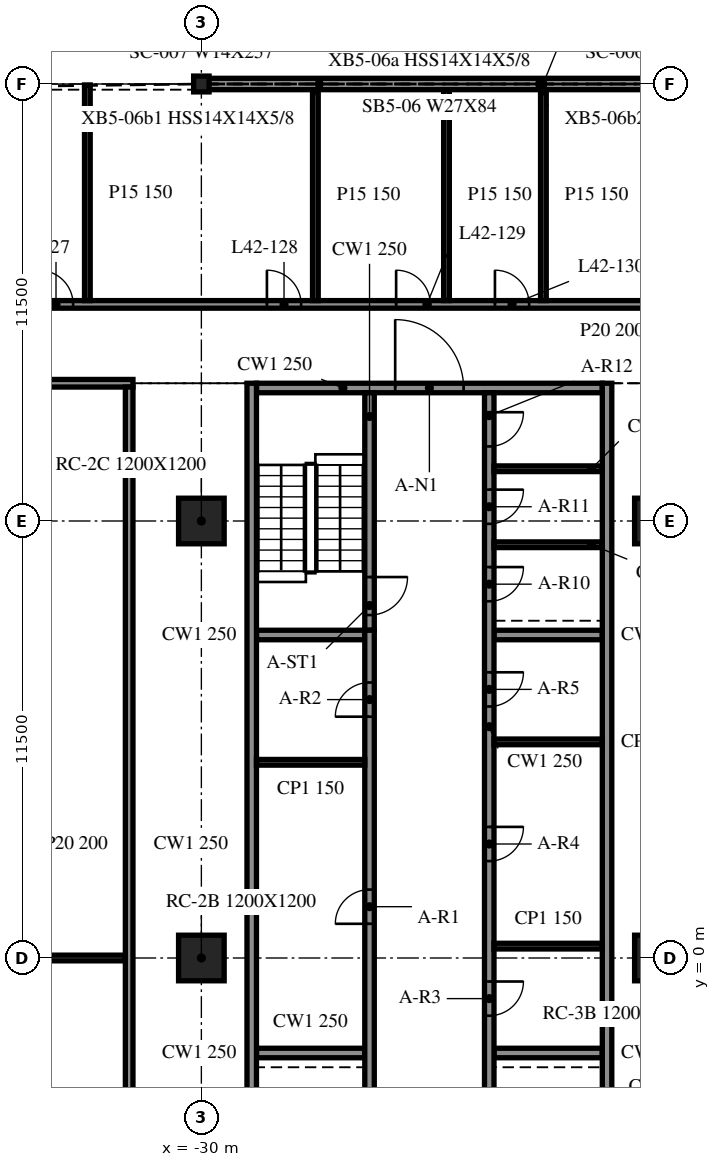
"""IFC4 building model, lengths in metres.
Left out: names, types, materials, properties, quantities, classifications, styles, units other than length and angle.
Written with IfcOpenShell. Run it as: python <this file> out.ifc"""

import sys

from ifc_helpers import new_model, si_unit, direction, frame, frame_2d, origin, origin_2d, place, context, subcontext, project, spatial, rectangle, i_section, extrude, element, fill, save


model = new_model("IFC4")
c1 = context("Model", 3, precision=1e-05, world=origin(), true_north=direction((0.0, 1.0)))
c2 = subcontext(c1, "Body", "Model", "MODEL_VIEW")
j1 = project(units=[si_unit("LENGTHUNIT", "METRE"), si_unit("PLANEANGLEUNIT", "RADIAN")], contexts=[c1])
p1 = place(None, origin())
s1 = spatial("IfcSite", under=j1, at=p1, CompositionType="ELEMENT")
p2 = place(p1, origin())
s2 = spatial("IfcBuilding", under=s1, at=p2, CompositionType="ELEMENT")
p3 = place(p2, frame((0.0, 0.0, 178.2)))
s3 = spatial("IfcBuildingStorey", under=s2, at=p3, CompositionType="ELEMENT", Elevation=178.2)
for number, where, z_axis, x_axis in (
    (1, (-30.0, 0.0, -0.34), (0.0, 0.0, 1.0), (1.0, 0.0, 0.0)),
    (2, (-30.0, 11.5, -0.34), (0.0, 0.0, 1.0), (1.0, 0.0, 0.0)),
    (3, (-18.0, 0.0, -0.34), (0.0, 0.0, 1.0), (1.0, 0.0, 0.0)),
    (4, (-18.0, 11.5, -0.34), (0.0, 0.0, 1.0), (1.0, 0.0, 0.0)),
):
    element("IfcColumn", number, at=place(p3, frame(where, z_axis=z_axis, x_axis=x_axis)), inside=s3, PredefinedType="COLUMN", context=c2, shape_type="SweptSolid", body=[
        extrude(rectangle(XDim=1.2, YDim=1.2, at=origin_2d()), origin(), (0.0, 0.0, 1.0), 3.8),
    ])
p4 = place(p3, frame((-30.0, 23.0, -0.34), z_axis=(0.0, 0.0, 1.0), x_axis=(1.0, 0.0, 0.0)))
e5 = element("IfcColumn", 5, at=p4, inside=s3, PredefinedType="COLUMN", context=c2, shape_type="SweptSolid", body=[
    extrude(i_section(OverallWidth=0.406, OverallDepth=0.417, WebThickness=0.03, FlangeThickness=0.048, at=origin_2d()), origin(), (0.0, 0.0, 1.0), 3.8),
])
p5 = place(p3, frame((-18.015, 23.0, 0.0), z_axis=(0.0, 0.0, 1.0), x_axis=(-1.0, 0.0, 0.0)))
e6 = element("IfcWall", 6, at=p5, inside=s3, PredefinedType="NOTDEFINED", context=c2, shape_type="SweptSolid", body=[
    extrude(rectangle(XDim=11.97, YDim=0.3, at=frame_2d((5.985, 0.0))), origin(), (0.0, 0.0, 1.0), 2.782),
])
for number, where, z_axis, x_axis in (
    (7, (-28.675, 15.125, 0.0), (0.0, 0.0, 1.0), (0.0, -1.0, 0.0)),
    (8, (-19.325, -9.125, 0.0), (0.0, 0.0, 1.0), (0.0, 1.0, 0.0)),
):
    element("IfcWall", number, at=place(p3, frame(where, z_axis=z_axis, x_axis=x_axis)), inside=s3, PredefinedType="SOLIDWALL", context=c2, shape_type="SweptSolid", body=[
        extrude(rectangle(XDim=24.25, YDim=0.25, at=frame_2d((12.125, 0.0))), origin(), (0.0, 0.0, 1.0), 3.46),
    ])
p6 = place(p3, frame((-28.55, 15.0, 0.0), z_axis=(0.0, 0.0, 1.0), x_axis=(1.0, 0.0, 0.0)))
e9 = element("IfcWall", 9, at=p6, inside=s3, PredefinedType="SOLIDWALL", context=c2, shape_type="SweptSolid", body=[
    extrude(rectangle(XDim=9.1, YDim=0.25, at=frame_2d((4.55, 0.0))), origin(), (0.0, 0.0, 1.0), 3.46),
])
p7 = place(p6, frame((3.65, 0.0, 0.0)))
e10 = element("IfcOpeningElement", 10, at=p7, cuts=e9, PredefinedType="OPENING", context=c2, shape_type="SweptSolid", body=[
    extrude(rectangle(XDim=1.8, YDim=2.1, at=frame_2d((0.9, 1.05))), frame((0.0, 0.135, 0.0), z_axis=(0.0, -1.0, 0.0), x_axis=(1.0, 0.0, 0.0)), (0.0, 0.0, 1.0), 0.27),
])
p8 = place(p3, frame((-25.575, -8.875, 0.0), z_axis=(0.0, 0.0, 1.0), x_axis=(0.0, 1.0, 0.0)))
e11 = element("IfcWall", 11, at=p8, inside=s3, PredefinedType="SOLIDWALL", context=c2, shape_type="SweptSolid", body=[
    extrude(rectangle(XDim=17.5, YDim=0.25, at=frame_2d((8.75, 0.0))), origin(), (0.0, 0.0, 1.0), 3.46),
])
p9 = place(p8, frame((9.775, 0.0, 0.0)))
e12 = element("IfcOpeningElement", 12, at=p9, cuts=e11, PredefinedType="OPENING", context=c2, shape_type="SweptSolid", body=[
    extrude(rectangle(XDim=0.9, YDim=2.1, at=frame_2d((0.45, 1.05))), frame((0.0, 0.135, 0.0), z_axis=(0.0, -1.0, 0.0), x_axis=(1.0, 0.0, 0.0)), (0.0, 0.0, 1.0), 0.27),
])
p10 = place(p8, frame((15.225, 0.0, 0.0)))
e13 = element("IfcOpeningElement", 13, at=p10, cuts=e11, PredefinedType="OPENING", context=c2, shape_type="SweptSolid", body=[
    extrude(rectangle(XDim=0.9, YDim=2.1, at=frame_2d((0.45, 1.05))), frame((0.0, 0.135, 0.0), z_axis=(0.0, -1.0, 0.0), x_axis=(1.0, 0.0, 0.0)), (0.0, 0.0, 1.0), 0.27),
])
p11 = place(p8, frame((0.712, 0.0, 0.0)))
e14 = element("IfcOpeningElement", 14, at=p11, cuts=e11, PredefinedType="OPENING", context=c2, shape_type="SweptSolid", body=[
    extrude(rectangle(XDim=0.9, YDim=2.1, at=frame_2d((0.45, 1.05))), frame((0.0, 0.135, 0.0), z_axis=(0.0, -1.0, 0.0), x_axis=(1.0, 0.0, 0.0)), (0.0, 0.0, 1.0), 0.27),
])
p12 = place(p8, frame((3.788, 0.0, 0.0)))
e15 = element("IfcOpeningElement", 15, at=p12, cuts=e11, PredefinedType="OPENING", context=c2, shape_type="SweptSolid", body=[
    extrude(rectangle(XDim=0.9, YDim=2.1, at=frame_2d((0.45, 1.05))), frame((0.0, 0.135, 0.0), z_axis=(0.0, -1.0, 0.0), x_axis=(1.0, 0.0, 0.0)), (0.0, 0.0, 1.0), 0.27),
])
p13 = place(p3, frame((-25.575, 14.875, 0.0), z_axis=(0.0, 0.0, 1.0), x_axis=(0.0, -1.0, 0.0)))
e16 = element("IfcWall", 16, at=p13, inside=s3, PredefinedType="SOLIDWALL", context=c2, shape_type="SweptSolid", body=[
    extrude(rectangle(XDim=6.25, YDim=0.25, at=frame_2d((3.125, 0.0))), origin(), (0.0, 0.0, 1.0), 3.46),
])
p14 = place(p13, frame((4.85, 0.0, 0.0)))
e17 = element("IfcOpeningElement", 17, at=p14, cuts=e16, PredefinedType="OPENING", context=c2, shape_type="SweptSolid", body=[
    extrude(rectangle(XDim=1.0, YDim=2.1, at=frame_2d((0.5, 1.05))), frame((0.0, 0.135, 0.0), z_axis=(0.0, -1.0, 0.0), x_axis=(1.0, 0.0, 0.0)), (0.0, 0.0, 1.0), 0.27),
])
p15 = place(p3, frame((-22.425, 14.875, 0.0), z_axis=(0.0, 0.0, 1.0), x_axis=(0.0, -1.0, 0.0)))
e18 = element("IfcWall", 18, at=p15, inside=s3, PredefinedType="SOLIDWALL", context=c2, shape_type="SweptSolid", body=[
    extrude(rectangle(XDim=23.75, YDim=0.25, at=frame_2d((11.875, 0.0))), origin(), (0.0, 0.0, 1.0), 3.46),
])
p16 = place(p15, frame((15.494, 0.0, 0.0)))
e19 = element("IfcOpeningElement", 19, at=p16, cuts=e18, PredefinedType="OPENING", context=c2, shape_type="SweptSolid", body=[
    extrude(rectangle(XDim=0.9, YDim=2.1, at=frame_2d((0.45, 1.05))), frame((0.0, 0.135, 0.0), z_axis=(0.0, -1.0, 0.0), x_axis=(1.0, 0.0, 0.0)), (0.0, 0.0, 1.0), 0.27),
])
p17 = place(p15, frame((11.425, 0.0, 0.0)))
e20 = element("IfcOpeningElement", 20, at=p17, cuts=e18, PredefinedType="OPENING", context=c2, shape_type="SweptSolid", body=[
    extrude(rectangle(XDim=0.9, YDim=2.1, at=frame_2d((0.45, 1.05))), frame((0.0, 0.135, 0.0), z_axis=(0.0, -1.0, 0.0), x_axis=(1.0, 0.0, 0.0)), (0.0, 0.0, 1.0), 0.27),
])
p18 = place(p15, frame((7.356, 0.0, 0.0)))
e21 = element("IfcOpeningElement", 21, at=p18, cuts=e18, PredefinedType="OPENING", context=c2, shape_type="SweptSolid", body=[
    extrude(rectangle(XDim=0.9, YDim=2.1, at=frame_2d((0.45, 1.05))), frame((0.0, 0.135, 0.0), z_axis=(0.0, -1.0, 0.0), x_axis=(1.0, 0.0, 0.0)), (0.0, 0.0, 1.0), 0.27),
])
p19 = place(p15, frame((21.837, 0.0, 0.0)))
e22 = element("IfcOpeningElement", 22, at=p19, cuts=e18, PredefinedType="OPENING", context=c2, shape_type="SweptSolid", body=[
    extrude(rectangle(XDim=0.9, YDim=2.1, at=frame_2d((0.45, 1.05))), frame((0.0, 0.135, 0.0), z_axis=(0.0, -1.0, 0.0), x_axis=(1.0, 0.0, 0.0)), (0.0, 0.0, 1.0), 0.27),
])
p20 = place(p15, frame((18.762, 0.0, 0.0)))
e23 = element("IfcOpeningElement", 23, at=p20, cuts=e18, PredefinedType="OPENING", context=c2, shape_type="SweptSolid", body=[
    extrude(rectangle(XDim=0.9, YDim=2.1, at=frame_2d((0.45, 1.05))), frame((0.0, 0.135, 0.0), z_axis=(0.0, -1.0, 0.0), x_axis=(1.0, 0.0, 0.0)), (0.0, 0.0, 1.0), 0.27),
])
p21 = place(p15, frame((4.587, 0.0, 0.0)))
e24 = element("IfcOpeningElement", 24, at=p21, cuts=e18, PredefinedType="OPENING", context=c2, shape_type="SweptSolid", body=[
    extrude(rectangle(XDim=0.9, YDim=2.1, at=frame_2d((0.45, 1.05))), frame((0.0, 0.135, 0.0), z_axis=(0.0, -1.0, 0.0), x_axis=(1.0, 0.0, 0.0)), (0.0, 0.0, 1.0), 0.27),
])
p22 = place(p15, frame((2.55, 0.0, 0.0)))
e25 = element("IfcOpeningElement", 25, at=p22, cuts=e18, PredefinedType="OPENING", context=c2, shape_type="SweptSolid", body=[
    extrude(rectangle(XDim=0.9, YDim=2.1, at=frame_2d((0.45, 1.05))), frame((0.0, 0.135, 0.0), z_axis=(0.0, -1.0, 0.0), x_axis=(1.0, 0.0, 0.0)), (0.0, 0.0, 1.0), 0.27),
])
p23 = place(p15, frame((0.512, 0.0, 0.0)))
e26 = element("IfcOpeningElement", 26, at=p23, cuts=e18, PredefinedType="OPENING", context=c2, shape_type="SweptSolid", body=[
    extrude(rectangle(XDim=0.9, YDim=2.1, at=frame_2d((0.45, 1.05))), frame((0.0, 0.135, 0.0), z_axis=(0.0, -1.0, 0.0), x_axis=(1.0, 0.0, 0.0)), (0.0, 0.0, 1.0), 0.27),
])
for number, where, z_axis, x_axis in (
    (27, (-28.55, -2.5, 0.0), (0.0, 0.0, 1.0), (1.0, 0.0, 0.0)),
    (28, (-28.55, 8.5, 0.0), (0.0, 0.0, 1.0), (1.0, 0.0, 0.0)),
    (29, (-22.3, -2.5, 0.0), (0.0, 0.0, 1.0), (1.0, 0.0, 0.0)),
    (30, (-22.3, 8.5, 0.0), (0.0, 0.0, 1.0), (1.0, 0.0, 0.0)),
):
    element("IfcWall", number, at=place(p3, frame(where, z_axis=z_axis, x_axis=x_axis)), inside=s3, PredefinedType="SOLIDWALL", context=c2, shape_type="SweptSolid", body=[
        extrude(rectangle(XDim=2.85, YDim=0.25, at=frame_2d((1.425, 0.0))), origin(), (0.0, 0.0, 1.0), 3.46),
    ])
for number, where, z_axis, x_axis in (
    (31, (-28.55, 5.15, 0.0), (0.0, 0.0, 1.0), (1.0, 0.0, 0.0)),
    (32, (-22.3, 0.312, 0.0), (0.0, 0.0, 1.0), (1.0, 0.0, 0.0)),
    (33, (-22.3, 5.688, 0.0), (0.0, 0.0, 1.0), (1.0, 0.0, 0.0)),
    (34, (-22.3, 10.875, 0.0), (0.0, 0.0, 1.0), (1.0, 0.0, 0.0)),
    (35, (-22.3, 12.875, 0.0), (0.0, 0.0, 1.0), (1.0, 0.0, 0.0)),
):
    element("IfcWall", number, at=place(p3, frame(where, z_axis=z_axis, x_axis=x_axis)), inside=s3, PredefinedType="PARTITIONING", context=c2, shape_type="SweptSolid", body=[
        extrude(rectangle(XDim=2.85, YDim=0.15, at=frame_2d((1.425, 0.0))), origin(), (0.0, 0.0, 1.0), 3.46),
    ])
p24 = place(p3, frame((-41.4, 0.0, 0.0), z_axis=(0.0, 0.0, 1.0), x_axis=(1.0, 0.0, 0.0)))
e36 = element("IfcWall", 36, at=p24, inside=s3, PredefinedType="PARTITIONING", context=c2, shape_type="SweptSolid", body=[
    extrude(rectangle(XDim=9.4, YDim=0.15, at=frame_2d((4.7, 0.0))), origin(), (0.0, 0.0, 1.0), 3.46),
])
p25 = place(p3, frame((-47.975, 15.125, 0.0), z_axis=(0.0, 0.0, 1.0), x_axis=(1.0, 0.0, 0.0)))
e37 = element("IfcWall", 37, at=p25, inside=s3, PredefinedType="PARTITIONING", context=c2, shape_type="SweptSolid", body=[
    extrude(rectangle(XDim=16.175, YDim=0.2, at=frame_2d((8.087, 0.0))), origin(), (0.0, 0.0, 1.0), 3.46),
])
p26 = place(p25, frame((7.5, 0.0, 0.0)))
e38 = element("IfcOpeningElement", 38, at=p26, cuts=e37, PredefinedType="OPENING", context=c2, shape_type="SweptSolid", body=[
    extrude(rectangle(XDim=1.0, YDim=2.1, at=frame_2d((0.5, 1.05))), frame((0.0, 0.11, 0.0), z_axis=(0.0, -1.0, 0.0), x_axis=(1.0, 0.0, 0.0)), (0.0, 0.0, 1.0), 0.22),
])
p27 = place(p3, frame((-47.975, 17.2, 0.0), z_axis=(0.0, 0.0, 1.0), x_axis=(1.0, 0.0, 0.0)))
e39 = element("IfcWall", 39, at=p27, inside=s3, PredefinedType="PARTITIONING", context=c2, shape_type="SweptSolid", body=[
    extrude(rectangle(XDim=95.95, YDim=0.2, at=frame_2d((47.975, 0.0))), origin(), (0.0, 0.0, 1.0), 3.46),
])
p28 = place(p27, frame((13.7, 0.0, 0.0)))
e40 = element("IfcOpeningElement", 40, at=p28, cuts=e39, PredefinedType="OPENING", context=c2, shape_type="SweptSolid", body=[
    extrude(rectangle(XDim=0.9, YDim=2.1, at=frame_2d((0.45, 1.05))), frame((0.0, 0.11, 0.0), z_axis=(0.0, -1.0, 0.0), x_axis=(1.0, 0.0, 0.0)), (0.0, 0.0, 1.0), 0.22),
])
p29 = place(p27, frame((19.7, 0.0, 0.0)))
e41 = element("IfcOpeningElement", 41, at=p29, cuts=e39, PredefinedType="OPENING", context=c2, shape_type="SweptSolid", body=[
    extrude(rectangle(XDim=0.9, YDim=2.1, at=frame_2d((0.45, 1.05))), frame((0.0, 0.11, 0.0), z_axis=(0.0, -1.0, 0.0), x_axis=(1.0, 0.0, 0.0)), (0.0, 0.0, 1.0), 0.22),
])
p30 = place(p27, frame((23.1, 0.0, 0.0)))
e42 = element("IfcOpeningElement", 42, at=p30, cuts=e39, PredefinedType="OPENING", context=c2, shape_type="SweptSolid", body=[
    extrude(rectangle(XDim=0.9, YDim=2.1, at=frame_2d((0.45, 1.05))), frame((0.0, 0.11, 0.0), z_axis=(0.0, -1.0, 0.0), x_axis=(1.0, 0.0, 0.0)), (0.0, 0.0, 1.0), 0.22),
])
p31 = place(p27, frame((25.7, 0.0, 0.0)))
e43 = element("IfcOpeningElement", 43, at=p31, cuts=e39, PredefinedType="OPENING", context=c2, shape_type="SweptSolid", body=[
    extrude(rectangle(XDim=0.9, YDim=2.1, at=frame_2d((0.45, 1.05))), frame((0.0, 0.11, 0.0), z_axis=(0.0, -1.0, 0.0), x_axis=(1.0, 0.0, 0.0)), (0.0, 0.0, 1.0), 0.22),
])
p32 = place(p27, frame((40.7, 0.0, 0.0)))
e44 = element("IfcOpeningElement", 44, at=p32, cuts=e39, PredefinedType="OPENING", context=c2, shape_type="SweptSolid", body=[
    extrude(rectangle(XDim=0.9, YDim=2.1, at=frame_2d((0.45, 1.05))), frame((0.0, 0.11, 0.0), z_axis=(0.0, -1.0, 0.0), x_axis=(1.0, 0.0, 0.0)), (0.0, 0.0, 1.0), 0.22),
])
p33 = place(p27, frame((46.7, 0.0, 0.0)))
e45 = element("IfcOpeningElement", 45, at=p33, cuts=e39, PredefinedType="OPENING", context=c2, shape_type="SweptSolid", body=[
    extrude(rectangle(XDim=0.9, YDim=2.1, at=frame_2d((0.45, 1.05))), frame((0.0, 0.11, 0.0), z_axis=(0.0, -1.0, 0.0), x_axis=(1.0, 0.0, 0.0)), (0.0, 0.0, 1.0), 0.22),
])
p34 = place(p27, frame((48.1, 0.0, 0.0)))
e46 = element("IfcOpeningElement", 46, at=p34, cuts=e39, PredefinedType="OPENING", context=c2, shape_type="SweptSolid", body=[
    extrude(rectangle(XDim=0.9, YDim=2.1, at=frame_2d((0.45, 1.05))), frame((0.0, 0.11, 0.0), z_axis=(0.0, -1.0, 0.0), x_axis=(1.0, 0.0, 0.0)), (0.0, 0.0, 1.0), 0.22),
])
p35 = place(p27, frame((51.5, 0.0, 0.0)))
e47 = element("IfcOpeningElement", 47, at=p35, cuts=e39, PredefinedType="OPENING", context=c2, shape_type="SweptSolid", body=[
    extrude(rectangle(XDim=0.9, YDim=2.1, at=frame_2d((0.45, 1.05))), frame((0.0, 0.11, 0.0), z_axis=(0.0, -1.0, 0.0), x_axis=(1.0, 0.0, 0.0)), (0.0, 0.0, 1.0), 0.22),
])
p36 = place(p27, frame((54.5, 0.0, 0.0)))
e48 = element("IfcOpeningElement", 48, at=p36, cuts=e39, PredefinedType="OPENING", context=c2, shape_type="SweptSolid", body=[
    extrude(rectangle(XDim=0.9, YDim=2.1, at=frame_2d((0.45, 1.05))), frame((0.0, 0.11, 0.0), z_axis=(0.0, -1.0, 0.0), x_axis=(1.0, 0.0, 0.0)), (0.0, 0.0, 1.0), 0.22),
])
p37 = place(p27, frame((69.1, 0.0, 0.0)))
e49 = element("IfcOpeningElement", 49, at=p37, cuts=e39, PredefinedType="OPENING", context=c2, shape_type="SweptSolid", body=[
    extrude(rectangle(XDim=0.9, YDim=2.1, at=frame_2d((0.45, 1.05))), frame((0.0, 0.11, 0.0), z_axis=(0.0, -1.0, 0.0), x_axis=(1.0, 0.0, 0.0)), (0.0, 0.0, 1.0), 0.22),
])
p38 = place(p27, frame((75.1, 0.0, 0.0)))
e50 = element("IfcOpeningElement", 50, at=p38, cuts=e39, PredefinedType="OPENING", context=c2, shape_type="SweptSolid", body=[
    extrude(rectangle(XDim=0.9, YDim=2.1, at=frame_2d((0.45, 1.05))), frame((0.0, 0.11, 0.0), z_axis=(0.0, -1.0, 0.0), x_axis=(1.0, 0.0, 0.0)), (0.0, 0.0, 1.0), 0.22),
])
p39 = place(p27, frame((78.1, 0.0, 0.0)))
e51 = element("IfcOpeningElement", 51, at=p39, cuts=e39, PredefinedType="OPENING", context=c2, shape_type="SweptSolid", body=[
    extrude(rectangle(XDim=0.9, YDim=2.1, at=frame_2d((0.45, 1.05))), frame((0.0, 0.11, 0.0), z_axis=(0.0, -1.0, 0.0), x_axis=(1.0, 0.0, 0.0)), (0.0, 0.0, 1.0), 0.22),
])
p40 = place(p27, frame((81.1, 0.0, 0.0)))
e52 = element("IfcOpeningElement", 52, at=p40, cuts=e39, PredefinedType="OPENING", context=c2, shape_type="SweptSolid", body=[
    extrude(rectangle(XDim=0.9, YDim=2.1, at=frame_2d((0.45, 1.05))), frame((0.0, 0.11, 0.0), z_axis=(0.0, -1.0, 0.0), x_axis=(1.0, 0.0, 0.0)), (0.0, 0.0, 1.0), 0.22),
])
p41 = place(p3, frame((-33.0, 17.3, 0.0), z_axis=(0.0, 0.0, 1.0), x_axis=(0.0, 1.0, 0.0)))
e53 = element("IfcWall", 53, at=p41, inside=s3, PredefinedType="PARTITIONING", context=c2, shape_type="SweptSolid", body=[
    extrude(rectangle(XDim=5.675, YDim=0.15, at=frame_2d((2.837, 0.0))), origin(), (0.0, 0.0, 1.0), 3.46),
])
p42 = place(p3, frame((-31.9, -9.025, 0.0), z_axis=(0.0, 0.0, 1.0), x_axis=(0.0, 1.0, 0.0)))
e54 = element("IfcWall", 54, at=p42, inside=s3, PredefinedType="PARTITIONING", context=c2, shape_type="SweptSolid", body=[
    extrude(rectangle(XDim=24.05, YDim=0.2, at=frame_2d((12.025, 0.0))), origin(), (0.0, 0.0, 1.0), 3.46),
])
for number, where, z_axis, x_axis in (
    (55, (-27.0, 17.3, 0.0), (0.0, 0.0, 1.0), (0.0, 1.0, 0.0)),
    (56, (-23.55, 17.3, 0.0), (0.0, 0.0, 1.0), (0.0, 1.0, 0.0)),
    (57, (-21.0, 17.3, 0.0), (0.0, 0.0, 1.0), (0.0, 1.0, 0.0)),
):
    element("IfcWall", number, at=place(p3, frame(where, z_axis=z_axis, x_axis=x_axis)), inside=s3, PredefinedType="PARTITIONING", context=c2, shape_type="SweptSolid", body=[
        extrude(rectangle(XDim=5.55, YDim=0.15, at=frame_2d((2.775, 0.0))), origin(), (0.0, 0.0, 1.0), 3.46),
    ])
p43 = place(p7, origin())
e58 = element("IfcDoor", 58, at=p43, inside=s3, OperationType="DOUBLE_DOOR_SINGLE_SWING", PredefinedType="DOOR", context=c2, shape_type="SweptSolid", body=[
    extrude(rectangle(XDim=1.8, YDim=2.1, at=frame_2d((0.9, 1.05))), frame((0.0, 0.025, 0.0), z_axis=(0.0, -1.0, 0.0), x_axis=(1.0, 0.0, 0.0)), (0.0, 0.0, 1.0), 0.05),
])
fill(e10, e58)
p44 = place(p9, origin())
e59 = element("IfcDoor", 59, at=p44, inside=s3, OperationType="SINGLE_SWING_LEFT", PredefinedType="DOOR", context=c2, shape_type="SweptSolid", body=[
    extrude(rectangle(XDim=0.9, YDim=2.1, at=frame_2d((0.45, 1.05))), frame((0.0, 0.025, 0.0), z_axis=(0.0, -1.0, 0.0), x_axis=(1.0, 0.0, 0.0)), (0.0, 0.0, 1.0), 0.05),
])
fill(e12, e59)
p45 = place(p10, origin())
e60 = element("IfcDoor", 60, at=p45, inside=s3, OperationType="SINGLE_SWING_RIGHT", PredefinedType="DOOR", context=c2, shape_type="SweptSolid", body=[
    extrude(rectangle(XDim=0.9, YDim=2.1, at=frame_2d((0.45, 1.05))), frame((0.0, 0.025, 0.0), z_axis=(0.0, -1.0, 0.0), x_axis=(1.0, 0.0, 0.0)), (0.0, 0.0, 1.0), 0.05),
])
fill(e13, e60)
p46 = place(p16, origin())
e61 = element("IfcDoor", 61, at=p46, inside=s3, OperationType="SINGLE_SWING_LEFT", PredefinedType="DOOR", context=c2, shape_type="SweptSolid", body=[
    extrude(rectangle(XDim=0.9, YDim=2.1, at=frame_2d((0.45, 1.05))), frame((0.0, 0.025, 0.0), z_axis=(0.0, -1.0, 0.0), x_axis=(1.0, 0.0, 0.0)), (0.0, 0.0, 1.0), 0.05),
])
fill(e19, e61)
p47 = place(p17, origin())
e62 = element("IfcDoor", 62, at=p47, inside=s3, OperationType="SINGLE_SWING_RIGHT", PredefinedType="DOOR", context=c2, shape_type="SweptSolid", body=[
    extrude(rectangle(XDim=0.9, YDim=2.1, at=frame_2d((0.45, 1.05))), frame((0.0, 0.025, 0.0), z_axis=(0.0, -1.0, 0.0), x_axis=(1.0, 0.0, 0.0)), (0.0, 0.0, 1.0), 0.05),
])
fill(e20, e62)
p48 = place(p18, origin())
e63 = element("IfcDoor", 63, at=p48, inside=s3, OperationType="SINGLE_SWING_LEFT", PredefinedType="DOOR", context=c2, shape_type="SweptSolid", body=[
    extrude(rectangle(XDim=0.9, YDim=2.1, at=frame_2d((0.45, 1.05))), frame((0.0, 0.025, 0.0), z_axis=(0.0, -1.0, 0.0), x_axis=(1.0, 0.0, 0.0)), (0.0, 0.0, 1.0), 0.05),
])
fill(e21, e63)
p49 = place(p21, origin())
e64 = element("IfcDoor", 64, at=p49, inside=s3, OperationType="SINGLE_SWING_RIGHT", PredefinedType="DOOR", context=c2, shape_type="SweptSolid", body=[
    extrude(rectangle(XDim=0.9, YDim=2.1, at=frame_2d((0.45, 1.05))), frame((0.0, 0.025, 0.0), z_axis=(0.0, -1.0, 0.0), x_axis=(1.0, 0.0, 0.0)), (0.0, 0.0, 1.0), 0.05),
])
fill(e24, e64)
p50 = place(p22, origin())
e65 = element("IfcDoor", 65, at=p50, inside=s3, OperationType="SINGLE_SWING_LEFT", PredefinedType="DOOR", context=c2, shape_type="SweptSolid", body=[
    extrude(rectangle(XDim=0.9, YDim=2.1, at=frame_2d((0.45, 1.05))), frame((0.0, 0.025, 0.0), z_axis=(0.0, -1.0, 0.0), x_axis=(1.0, 0.0, 0.0)), (0.0, 0.0, 1.0), 0.05),
])
fill(e25, e65)
p51 = place(p23, origin())
e66 = element("IfcDoor", 66, at=p51, inside=s3, OperationType="SINGLE_SWING_RIGHT", PredefinedType="DOOR", context=c2, shape_type="SweptSolid", body=[
    extrude(rectangle(XDim=0.9, YDim=2.1, at=frame_2d((0.45, 1.05))), frame((0.0, 0.025, 0.0), z_axis=(0.0, -1.0, 0.0), x_axis=(1.0, 0.0, 0.0)), (0.0, 0.0, 1.0), 0.05),
])
fill(e26, e66)
p52 = place(p14, origin())
e67 = element("IfcDoor", 67, at=p52, inside=s3, OperationType="SINGLE_SWING_LEFT", PredefinedType="DOOR", context=c2, shape_type="SweptSolid", body=[
    extrude(rectangle(XDim=1.0, YDim=2.1, at=frame_2d((0.5, 1.05))), frame((0.0, 0.025, 0.0), z_axis=(0.0, -1.0, 0.0), x_axis=(1.0, 0.0, 0.0)), (0.0, 0.0, 1.0), 0.05),
])
fill(e17, e67)
p53 = place(p28, origin())
e68 = element("IfcDoor", 68, at=p53, inside=s3, OperationType="SINGLE_SWING_LEFT", PredefinedType="DOOR", context=c2, shape_type="SweptSolid", body=[
    extrude(rectangle(XDim=0.9, YDim=2.1, at=frame_2d((0.45, 1.05))), frame((0.0, 0.025, 0.0), z_axis=(0.0, -1.0, 0.0), x_axis=(1.0, 0.0, 0.0)), (0.0, 0.0, 1.0), 0.05),
])
fill(e40, e68)
p54 = place(p29, origin())
e69 = element("IfcDoor", 69, at=p54, inside=s3, OperationType="SINGLE_SWING_LEFT", PredefinedType="DOOR", context=c2, shape_type="SweptSolid", body=[
    extrude(rectangle(XDim=0.9, YDim=2.1, at=frame_2d((0.45, 1.05))), frame((0.0, 0.025, 0.0), z_axis=(0.0, -1.0, 0.0), x_axis=(1.0, 0.0, 0.0)), (0.0, 0.0, 1.0), 0.05),
])
fill(e41, e69)
p55 = place(p30, origin())
e70 = element("IfcDoor", 70, at=p55, inside=s3, OperationType="SINGLE_SWING_LEFT", PredefinedType="DOOR", context=c2, shape_type="SweptSolid", body=[
    extrude(rectangle(XDim=0.9, YDim=2.1, at=frame_2d((0.45, 1.05))), frame((0.0, 0.025, 0.0), z_axis=(0.0, -1.0, 0.0), x_axis=(1.0, 0.0, 0.0)), (0.0, 0.0, 1.0), 0.05),
])
fill(e42, e70)
p56 = place(p31, origin())
e71 = element("IfcDoor", 71, at=p56, inside=s3, OperationType="SINGLE_SWING_LEFT", PredefinedType="DOOR", context=c2, shape_type="SweptSolid", body=[
    extrude(rectangle(XDim=0.9, YDim=2.1, at=frame_2d((0.45, 1.05))), frame((0.0, 0.025, 0.0), z_axis=(0.0, -1.0, 0.0), x_axis=(1.0, 0.0, 0.0)), (0.0, 0.0, 1.0), 0.05),
])
fill(e43, e71)
save(model, sys.argv[1])
